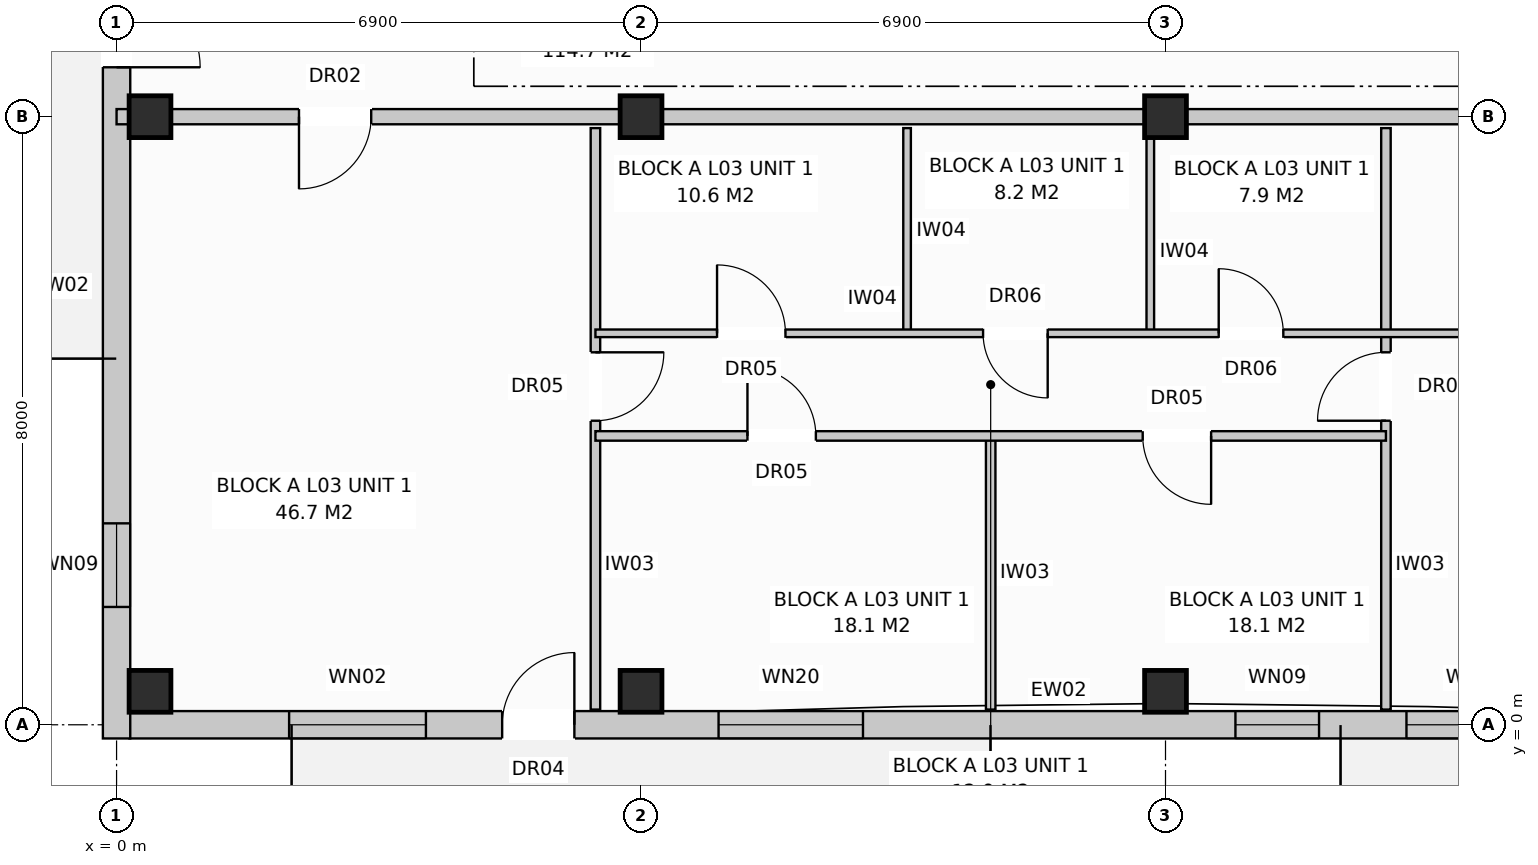
"""IFC4 building model, lengths in metres.
Left out: names, types, materials, properties, quantities, classifications, styles, units other than length and angle.
Written with IfcOpenShell. Run it as: python <this file> out.ifc"""

import sys

from ifc_helpers import new_model, si_unit, direction, frame, frame_2d, origin, origin_with_axes, origin_2d, place, context, subcontext, project, spatial, rectangle, extrude, element, fill, save


model = new_model("IFC4")
c1 = context("Model", 3, precision=1e-05, world=origin(), true_north=direction((0.0, 1.0)))
c2 = subcontext(c1, "Body", "Model", "MODEL_VIEW")
j1 = project(units=[si_unit("LENGTHUNIT", "METRE"), si_unit("PLANEANGLEUNIT", "RADIAN")], contexts=[c1])
p1 = place(None, origin())
s1 = spatial("IfcSite", under=j1, at=p1, CompositionType="ELEMENT")
p2 = place(p1, origin())
s2 = spatial("IfcBuilding", under=s1, at=p2, CompositionType="ELEMENT")
p3 = place(p2, frame((0.0, 0.0, 11.2)))
s3 = spatial("IfcBuildingStorey", under=s2, at=p3, CompositionType="ELEMENT", Elevation=11.2)
for number, where, z_axis, x_axis in (
    (1, (0.44, 0.44, 0.0), (0.0, 0.0, 1.0), (1.0, 0.0, 0.0)),
    (2, (0.44, 8.0, 0.0), (0.0, 0.0, 1.0), (1.0, 0.0, 0.0)),
    (3, (6.9, 0.44, 0.0), (0.0, 0.0, 1.0), (1.0, 0.0, 0.0)),
    (4, (6.9, 8.0, 0.0), (0.0, 0.0, 1.0), (1.0, 0.0, 0.0)),
    (5, (13.8, 0.44, 0.0), (0.0, 0.0, 1.0), (1.0, 0.0, 0.0)),
    (6, (13.8, 8.0, 0.0), (0.0, 0.0, 1.0), (1.0, 0.0, 0.0)),
):
    element("IfcColumn", number, at=place(p3, frame(where, z_axis=z_axis, x_axis=x_axis)), inside=s3, PredefinedType="COLUMN", context=c2, shape_type="SweptSolid", body=[
        extrude(rectangle(XDim=0.55, YDim=0.55, at=origin_2d()), origin(), (0.0, 0.0, 1.0), 3.2),
    ])
p4 = place(p3, frame((0.17, 0.0, 0.0), z_axis=(0.0, 0.0, 1.0), x_axis=(1.0, 0.0, 0.0)))
e7 = element("IfcWall", 7, at=p4, inside=s3, PredefinedType="STANDARD", context=c2, shape_type="SweptSolid", body=[
    extrude(rectangle(XDim=54.86, YDim=0.36, at=frame_2d((27.43, 0.0))), origin(), (0.0, 0.0, 1.0), 2.94),
])
p5 = place(p4, frame((4.903, 0.0, 0.0)))
e8 = element("IfcOpeningElement", 8, at=p5, cuts=e7, PredefinedType="OPENING", context=c2, shape_type="SweptSolid", body=[
    extrude(rectangle(XDim=0.95, YDim=2.1, at=frame_2d((0.475, 1.05))), frame((0.0, 0.192, 0.0), z_axis=(0.0, -1.0, 0.0), x_axis=(1.0, 0.0, 0.0)), (0.0, 0.0, 1.0), 0.384),
])
p6 = place(p4, frame((18.9, 0.0, 0.0)))
e9 = element("IfcOpeningElement", 9, at=p6, cuts=e7, PredefinedType="OPENING", context=c2, shape_type="SweptSolid", body=[
    extrude(rectangle(XDim=0.95, YDim=2.1, at=frame_2d((0.475, 1.05))), frame((0.0, 0.192, 0.0), z_axis=(0.0, -1.0, 0.0), x_axis=(1.0, 0.0, 0.0)), (0.0, 0.0, 1.0), 0.384),
])
p7 = place(p4, frame((31.403, 0.0, 0.0)))
e10 = element("IfcOpeningElement", 10, at=p7, cuts=e7, PredefinedType="OPENING", context=c2, shape_type="SweptSolid", body=[
    extrude(rectangle(XDim=0.95, YDim=2.1, at=frame_2d((0.475, 1.05))), frame((0.0, 0.192, 0.0), z_axis=(0.0, -1.0, 0.0), x_axis=(1.0, 0.0, 0.0)), (0.0, 0.0, 1.0), 0.384),
])
p8 = place(p4, frame((44.308, 0.0, 0.0)))
e11 = element("IfcOpeningElement", 11, at=p8, cuts=e7, PredefinedType="OPENING", context=c2, shape_type="SweptSolid", body=[
    extrude(rectangle(XDim=0.95, YDim=2.1, at=frame_2d((0.475, 1.05))), frame((0.0, 0.192, 0.0), z_axis=(0.0, -1.0, 0.0), x_axis=(1.0, 0.0, 0.0)), (0.0, 0.0, 1.0), 0.384),
])
p9 = place(p4, frame((2.1, 0.0, 0.8)))
e12 = element("IfcOpeningElement", 12, at=p9, cuts=e7, PredefinedType="OPENING", context=c2, shape_type="SweptSolid", body=[
    extrude(rectangle(XDim=1.8, YDim=1.7, at=frame_2d((0.9, 0.85))), frame((0.0, 0.192, 0.0), z_axis=(0.0, -1.0, 0.0), x_axis=(1.0, 0.0, 0.0)), (0.0, 0.0, 1.0), 0.384),
])
p10 = place(p4, frame((7.75, 0.0, 0.72)))
e13 = element("IfcOpeningElement", 13, at=p10, cuts=e7, PredefinedType="OPENING", context=c2, shape_type="SweptSolid", body=[
    extrude(rectangle(XDim=1.9, YDim=1.85, at=frame_2d((0.95, 0.925))), frame((0.0, 0.192, 0.0), z_axis=(0.0, -1.0, 0.0), x_axis=(1.0, 0.0, 0.0)), (0.0, 0.0, 1.0), 0.384),
])
p11 = place(p4, frame((14.55, 0.0, 0.72)))
e14 = element("IfcOpeningElement", 14, at=p11, cuts=e7, PredefinedType="OPENING", context=c2, shape_type="SweptSolid", body=[
    extrude(rectangle(XDim=1.1, YDim=1.5, at=frame_2d((0.55, 0.75))), frame((0.0, 0.192, 0.0), z_axis=(0.0, -1.0, 0.0), x_axis=(1.0, 0.0, 0.0)), (0.0, 0.0, 1.0), 0.384),
])
p12 = place(p4, frame((16.8, 0.0, 0.8)))
e15 = element("IfcOpeningElement", 15, at=p12, cuts=e7, PredefinedType="OPENING", context=c2, shape_type="SweptSolid", body=[
    extrude(rectangle(XDim=1.8, YDim=1.7, at=frame_2d((0.9, 0.85))), frame((0.0, 0.192, 0.0), z_axis=(0.0, -1.0, 0.0), x_axis=(1.0, 0.0, 0.0)), (0.0, 0.0, 1.0), 0.384),
])
p13 = place(p4, frame((21.55, 0.0, 0.72)))
e16 = element("IfcOpeningElement", 16, at=p13, cuts=e7, PredefinedType="OPENING", context=c2, shape_type="SweptSolid", body=[
    extrude(rectangle(XDim=1.9, YDim=1.85, at=frame_2d((0.95, 0.925))), frame((0.0, 0.192, 0.0), z_axis=(0.0, -1.0, 0.0), x_axis=(1.0, 0.0, 0.0)), (0.0, 0.0, 1.0), 0.384),
])
p14 = place(p4, frame((25.35, 0.0, 0.72)))
e17 = element("IfcOpeningElement", 17, at=p14, cuts=e7, PredefinedType="OPENING", context=c2, shape_type="SweptSolid", body=[
    extrude(rectangle(XDim=1.1, YDim=1.5, at=frame_2d((0.55, 0.75))), frame((0.0, 0.192, 0.0), z_axis=(0.0, -1.0, 0.0), x_axis=(1.0, 0.0, 0.0)), (0.0, 0.0, 1.0), 0.384),
])
p15 = place(p4, frame((29.55, 0.0, 0.72)))
e18 = element("IfcOpeningElement", 18, at=p15, cuts=e7, PredefinedType="OPENING", context=c2, shape_type="SweptSolid", body=[
    extrude(rectangle(XDim=1.1, YDim=1.5, at=frame_2d((0.55, 0.75))), frame((0.0, 0.192, 0.0), z_axis=(0.0, -1.0, 0.0), x_axis=(1.0, 0.0, 0.0)), (0.0, 0.0, 1.0), 0.384),
])
p16 = place(p4, frame((34.833, 0.0, 0.72)))
e19 = element("IfcOpeningElement", 19, at=p16, cuts=e7, PredefinedType="OPENING", context=c2, shape_type="SweptSolid", body=[
    extrude(rectangle(XDim=1.9, YDim=1.85, at=frame_2d((0.95, 0.925))), frame((0.0, 0.192, 0.0), z_axis=(0.0, -1.0, 0.0), x_axis=(1.0, 0.0, 0.0)), (0.0, 0.0, 1.0), 0.384),
])
p17 = place(p4, frame((38.45, 0.0, 0.72)))
e20 = element("IfcOpeningElement", 20, at=p17, cuts=e7, PredefinedType="OPENING", context=c2, shape_type="SweptSolid", body=[
    extrude(rectangle(XDim=1.1, YDim=1.5, at=frame_2d((0.55, 0.75))), frame((0.0, 0.192, 0.0), z_axis=(0.0, -1.0, 0.0), x_axis=(1.0, 0.0, 0.0)), (0.0, 0.0, 1.0), 0.384),
])
p18 = place(p4, frame((42.55, 0.0, 0.72)))
e21 = element("IfcOpeningElement", 21, at=p18, cuts=e7, PredefinedType="OPENING", context=c2, shape_type="SweptSolid", body=[
    extrude(rectangle(XDim=1.1, YDim=1.5, at=frame_2d((0.55, 0.75))), frame((0.0, 0.192, 0.0), z_axis=(0.0, -1.0, 0.0), x_axis=(1.0, 0.0, 0.0)), (0.0, 0.0, 1.0), 0.384),
])
p19 = place(p4, frame((45.75, 0.0, 0.72)))
e22 = element("IfcOpeningElement", 22, at=p19, cuts=e7, PredefinedType="OPENING", context=c2, shape_type="SweptSolid", body=[
    extrude(rectangle(XDim=1.9, YDim=1.85, at=frame_2d((0.95, 0.925))), frame((0.0, 0.192, 0.0), z_axis=(0.0, -1.0, 0.0), x_axis=(1.0, 0.0, 0.0)), (0.0, 0.0, 1.0), 0.384),
])
p20 = place(p4, frame((49.125, 0.0, 0.8)))
e23 = element("IfcOpeningElement", 23, at=p20, cuts=e7, PredefinedType="OPENING", context=c2, shape_type="SweptSolid", body=[
    extrude(rectangle(XDim=1.95, YDim=1.65, at=frame_2d((0.975, 0.825))), frame((0.0, 0.192, 0.0), z_axis=(0.0, -1.0, 0.0), x_axis=(1.0, 0.0, 0.0)), (0.0, 0.0, 1.0), 0.384),
])
p21 = place(p4, frame((52.95, 0.0, 0.72)))
e24 = element("IfcOpeningElement", 24, at=p21, cuts=e7, PredefinedType="OPENING", context=c2, shape_type="SweptSolid", body=[
    extrude(rectangle(XDim=1.1, YDim=1.5, at=frame_2d((0.55, 0.75))), frame((0.0, 0.192, 0.0), z_axis=(0.0, -1.0, 0.0), x_axis=(1.0, 0.0, 0.0)), (0.0, 0.0, 1.0), 0.384),
])
p22 = place(p3, frame((0.0, -0.18, 0.0), z_axis=(0.0, 0.0, 1.0), x_axis=(0.0, 1.0, 0.0)))
e25 = element("IfcWall", 25, at=p22, inside=s3, PredefinedType="STANDARD", context=c2, shape_type="SweptSolid", body=[
    extrude(rectangle(XDim=18.76, YDim=0.36, at=frame_2d((9.38, 0.0))), origin(), (0.0, 0.0, 1.0), 2.94),
])
p23 = place(p22, frame((8.83, 0.0, 0.0)))
e26 = element("IfcOpeningElement", 26, at=p23, cuts=e25, PredefinedType="OPENING", context=c2, shape_type="SweptSolid", body=[
    extrude(rectangle(XDim=1.1, YDim=2.1, at=frame_2d((0.55, 1.05))), frame((0.0, 0.192, 0.0), z_axis=(0.0, -1.0, 0.0), x_axis=(1.0, 0.0, 0.0)), (0.0, 0.0, 1.0), 0.384),
])
p24 = place(p22, frame((1.73, 0.0, 0.72)))
e27 = element("IfcOpeningElement", 27, at=p24, cuts=e25, PredefinedType="OPENING", context=c2, shape_type="SweptSolid", body=[
    extrude(rectangle(XDim=1.1, YDim=1.5, at=frame_2d((0.55, 0.75))), frame((0.0, 0.192, 0.0), z_axis=(0.0, -1.0, 0.0), x_axis=(1.0, 0.0, 0.0)), (0.0, 0.0, 1.0), 0.384),
])
p25 = place(p22, frame((15.93, 0.0, 0.72)))
e28 = element("IfcOpeningElement", 28, at=p25, cuts=e25, PredefinedType="OPENING", context=c2, shape_type="SweptSolid", body=[
    extrude(rectangle(XDim=1.1, YDim=1.5, at=frame_2d((0.55, 0.75))), frame((0.0, 0.192, 0.0), z_axis=(0.0, -1.0, 0.0), x_axis=(1.0, 0.0, 0.0)), (0.0, 0.0, 1.0), 0.384),
])
p26 = place(p3, frame((0.0, 8.0, 0.0), z_axis=(0.0, 0.0, 1.0), x_axis=(1.0, 0.0, 0.0)))
e29 = element("IfcWall", 29, at=p26, inside=s3, PredefinedType="PARTITIONING", context=c2, shape_type="SweptSolid", body=[
    extrude(rectangle(XDim=20.7, YDim=0.2, at=frame_2d((10.35, 0.0))), origin(), (0.0, 0.0, 1.0), 2.38),
])
p27 = place(p26, frame((2.4, 0.0, 0.0)))
e30 = element("IfcOpeningElement", 30, at=p27, cuts=e29, PredefinedType="OPENING", context=c2, shape_type="SweptSolid", body=[
    extrude(rectangle(XDim=0.95, YDim=2.15, at=frame_2d((0.475, 1.075))), frame((0.0, 0.112, 0.0), z_axis=(0.0, -1.0, 0.0), x_axis=(1.0, 0.0, 0.0)), (0.0, 0.0, 1.0), 0.224),
])
p28 = place(p3, frame((6.3, 7.85, 0.0), z_axis=(0.0, 0.0, 1.0), x_axis=(0.0, -1.0, 0.0)))
e31 = element("IfcWall", 31, at=p28, inside=s3, PredefinedType="PARTITIONING", context=c2, shape_type="SweptSolid", body=[
    extrude(rectangle(XDim=7.65, YDim=0.125, at=frame_2d((3.825, 0.0))), origin(), (0.0, 0.0, 1.0), 2.94),
])
p29 = place(p28, frame((2.95, 0.0, 0.0)))
e32 = element("IfcOpeningElement", 32, at=p29, cuts=e31, PredefinedType="OPENING", context=c2, shape_type="SweptSolid", body=[
    extrude(rectangle(XDim=0.9, YDim=2.1, at=frame_2d((0.45, 1.05))), frame((0.0, 0.074, 0.0), z_axis=(0.0, -1.0, 0.0), x_axis=(1.0, 0.0, 0.0)), (0.0, 0.0, 1.0), 0.149),
])
for number, where, z_axis, x_axis in (
    (33, (10.4, 7.85, 0.0), (0.0, 0.0, 1.0), (0.0, -1.0, 0.0)),
    (34, (13.6, 7.85, 0.0), (0.0, 0.0, 1.0), (0.0, -1.0, 0.0)),
):
    element("IfcWall", number, at=place(p3, frame(where, z_axis=z_axis, x_axis=x_axis)), inside=s3, PredefinedType="PARTITIONING", context=c2, shape_type="SweptSolid", body=[
        extrude(rectangle(XDim=2.7, YDim=0.1, at=frame_2d((1.35, 0.0))), origin(), (0.0, 0.0, 1.0), 2.94),
    ])
p30 = place(p3, frame((11.5, 3.8, 0.0), z_axis=(0.0, 0.0, 1.0), x_axis=(0.0, -1.0, 0.0)))
e35 = element("IfcWall", 35, at=p30, inside=s3, PredefinedType="PARTITIONING", context=c2, shape_type="SweptSolid", body=[
    extrude(rectangle(XDim=3.6, YDim=0.125, at=frame_2d((1.8, 0.0))), origin(), (0.0, 0.0, 1.0), 2.94),
])
p31 = place(p3, frame((16.7, 7.85, 0.0), z_axis=(0.0, 0.0, 1.0), x_axis=(0.0, -1.0, 0.0)))
e36 = element("IfcWall", 36, at=p31, inside=s3, PredefinedType="PARTITIONING", context=c2, shape_type="SweptSolid", body=[
    extrude(rectangle(XDim=7.65, YDim=0.125, at=frame_2d((3.825, 0.0))), origin(), (0.0, 0.0, 1.0), 2.94),
])
p32 = place(p31, frame((2.95, 0.0, 0.0)))
e37 = element("IfcOpeningElement", 37, at=p32, cuts=e36, PredefinedType="OPENING", context=c2, shape_type="SweptSolid", body=[
    extrude(rectangle(XDim=0.9, YDim=2.1, at=frame_2d((0.45, 1.05))), frame((0.0, 0.074, 0.0), z_axis=(0.0, -1.0, 0.0), x_axis=(1.0, 0.0, 0.0)), (0.0, 0.0, 1.0), 0.149),
])
p33 = place(p3, frame((6.3, 5.15, 0.0), z_axis=(0.0, 0.0, 1.0), x_axis=(1.0, 0.0, 0.0)))
e38 = element("IfcWall", 38, at=p33, inside=s3, PredefinedType="PARTITIONING", context=c2, shape_type="SweptSolid", body=[
    extrude(rectangle(XDim=14.3, YDim=0.1, at=frame_2d((7.15, 0.0))), origin(), (0.0, 0.0, 1.0), 2.94),
])
p34 = place(p33, frame((1.6, 0.0, 0.0)))
e39 = element("IfcOpeningElement", 39, at=p34, cuts=e38, PredefinedType="OPENING", context=c2, shape_type="SweptSolid", body=[
    extrude(rectangle(XDim=0.9, YDim=2.1, at=frame_2d((0.45, 1.05))), frame((0.0, 0.062, 0.0), z_axis=(0.0, -1.0, 0.0), x_axis=(1.0, 0.0, 0.0)), (0.0, 0.0, 1.0), 0.124),
])
p35 = place(p33, frame((5.1, 0.0, 0.0)))
e40 = element("IfcOpeningElement", 40, at=p35, cuts=e38, PredefinedType="OPENING", context=c2, shape_type="SweptSolid", body=[
    extrude(rectangle(XDim=0.85, YDim=2.05, at=frame_2d((0.425, 1.025))), frame((0.0, 0.062, 0.0), z_axis=(0.0, -1.0, 0.0), x_axis=(1.0, 0.0, 0.0)), (0.0, 0.0, 1.0), 0.124),
])
p36 = place(p33, frame((8.2, 0.0, 0.0)))
e41 = element("IfcOpeningElement", 41, at=p36, cuts=e38, PredefinedType="OPENING", context=c2, shape_type="SweptSolid", body=[
    extrude(rectangle(XDim=0.85, YDim=2.05, at=frame_2d((0.425, 1.025))), frame((0.0, 0.062, 0.0), z_axis=(0.0, -1.0, 0.0), x_axis=(1.0, 0.0, 0.0)), (0.0, 0.0, 1.0), 0.124),
])
p37 = place(p33, frame((11.6, 0.0, 0.0)))
e42 = element("IfcOpeningElement", 42, at=p37, cuts=e38, PredefinedType="OPENING", context=c2, shape_type="SweptSolid", body=[
    extrude(rectangle(XDim=0.85, YDim=2.05, at=frame_2d((0.425, 1.025))), frame((0.0, 0.062, 0.0), z_axis=(0.0, -1.0, 0.0), x_axis=(1.0, 0.0, 0.0)), (0.0, 0.0, 1.0), 0.124),
])
p38 = place(p3, frame((6.3, 3.8, 0.0), z_axis=(0.0, 0.0, 1.0), x_axis=(1.0, 0.0, 0.0)))
e43 = element("IfcWall", 43, at=p38, inside=s3, PredefinedType="PARTITIONING", context=c2, shape_type="SweptSolid", body=[
    extrude(rectangle(XDim=10.4, YDim=0.125, at=frame_2d((5.2, 0.0))), origin(), (0.0, 0.0, 1.0), 2.94),
])
p39 = place(p38, frame((2.0, 0.0, 0.0)))
e44 = element("IfcOpeningElement", 44, at=p39, cuts=e43, PredefinedType="OPENING", context=c2, shape_type="SweptSolid", body=[
    extrude(rectangle(XDim=0.9, YDim=2.1, at=frame_2d((0.45, 1.05))), frame((0.0, 0.074, 0.0), z_axis=(0.0, -1.0, 0.0), x_axis=(1.0, 0.0, 0.0)), (0.0, 0.0, 1.0), 0.149),
])
p40 = place(p38, frame((7.2, 0.0, 0.0)))
e45 = element("IfcOpeningElement", 45, at=p40, cuts=e43, PredefinedType="OPENING", context=c2, shape_type="SweptSolid", body=[
    extrude(rectangle(XDim=0.9, YDim=2.1, at=frame_2d((0.45, 1.05))), frame((0.0, 0.074, 0.0), z_axis=(0.0, -1.0, 0.0), x_axis=(1.0, 0.0, 0.0)), (0.0, 0.0, 1.0), 0.149),
])
p41 = place(p5, origin_with_axes())
e46 = element("IfcDoor", 46, at=p41, inside=s3, OperationType="SINGLE_SWING_RIGHT", PredefinedType="DOOR", context=c2, shape_type="SweptSolid", body=[
    extrude(rectangle(XDim=0.95, YDim=2.1, at=frame_2d((0.475, 1.05))), frame((0.0, 0.025, 0.0), z_axis=(0.0, -1.0, 0.0), x_axis=(1.0, 0.0, 0.0)), (0.0, 0.0, 1.0), 0.05),
])
fill(e8, e46)
p42 = place(p9, origin_with_axes())
e47 = element("IfcWindow", 47, at=p42, inside=s3, PartitioningType="SINGLE_PANEL", PredefinedType="WINDOW", context=c2, shape_type="SweptSolid", body=[
    extrude(rectangle(XDim=1.8, YDim=1.7, at=frame_2d((0.9, 0.85))), frame((0.0, 0.03, 0.0), z_axis=(0.0, -1.0, 0.0), x_axis=(1.0, 0.0, 0.0)), (0.0, 0.0, 1.0), 0.06),
])
fill(e12, e47)
p43 = place(p10, origin_with_axes())
e48 = element("IfcWindow", 48, at=p43, inside=s3, PartitioningType="SINGLE_PANEL", PredefinedType="WINDOW", context=c2, shape_type="SweptSolid", body=[
    extrude(rectangle(XDim=1.9, YDim=1.85, at=frame_2d((0.95, 0.925))), frame((0.0, 0.03, 0.0), z_axis=(0.0, -1.0, 0.0), x_axis=(1.0, 0.0, 0.0)), (0.0, 0.0, 1.0), 0.06),
])
fill(e13, e48)
p44 = place(p11, origin_with_axes())
e49 = element("IfcWindow", 49, at=p44, inside=s3, PartitioningType="SINGLE_PANEL", PredefinedType="WINDOW", context=c2, shape_type="SweptSolid", body=[
    extrude(rectangle(XDim=1.1, YDim=1.5, at=frame_2d((0.55, 0.75))), frame((0.0, 0.03, 0.0), z_axis=(0.0, -1.0, 0.0), x_axis=(1.0, 0.0, 0.0)), (0.0, 0.0, 1.0), 0.06),
])
fill(e14, e49)
p45 = place(p12, origin_with_axes())
e50 = element("IfcWindow", 50, at=p45, inside=s3, PartitioningType="SINGLE_PANEL", PredefinedType="WINDOW", context=c2, shape_type="SweptSolid", body=[
    extrude(rectangle(XDim=1.8, YDim=1.7, at=frame_2d((0.9, 0.85))), frame((0.0, 0.03, 0.0), z_axis=(0.0, -1.0, 0.0), x_axis=(1.0, 0.0, 0.0)), (0.0, 0.0, 1.0), 0.06),
])
fill(e15, e50)
p46 = place(p23, frame((1.1, 0.0, 0.0), z_axis=(0.0, 0.0, 1.0), x_axis=(-1.0, 0.0, 0.0)))
e51 = element("IfcDoor", 51, at=p46, inside=s3, OperationType="SINGLE_SWING_LEFT", PredefinedType="DOOR", context=c2, shape_type="SweptSolid", body=[
    extrude(rectangle(XDim=1.1, YDim=2.1, at=frame_2d((0.55, 1.05))), frame((0.0, 0.025, 0.0), z_axis=(0.0, -1.0, 0.0), x_axis=(1.0, 0.0, 0.0)), (0.0, 0.0, 1.0), 0.05),
])
fill(e26, e51)
p47 = place(p24, origin_with_axes())
e52 = element("IfcWindow", 52, at=p47, inside=s3, PartitioningType="SINGLE_PANEL", PredefinedType="WINDOW", context=c2, shape_type="SweptSolid", body=[
    extrude(rectangle(XDim=1.1, YDim=1.5, at=frame_2d((0.55, 0.75))), frame((0.0, 0.03, 0.0), z_axis=(0.0, -1.0, 0.0), x_axis=(1.0, 0.0, 0.0)), (0.0, 0.0, 1.0), 0.06),
])
fill(e27, e52)
p48 = place(p27, frame((0.95, 0.0, 0.0), z_axis=(0.0, 0.0, 1.0), x_axis=(-1.0, 0.0, 0.0)))
e53 = element("IfcDoor", 53, at=p48, inside=s3, OperationType="SINGLE_SWING_LEFT", PredefinedType="DOOR", context=c2, shape_type="SweptSolid", body=[
    extrude(rectangle(XDim=0.95, YDim=2.15, at=frame_2d((0.475, 1.075))), frame((0.0, 0.025, 0.0), z_axis=(0.0, -1.0, 0.0), x_axis=(1.0, 0.0, 0.0)), (0.0, 0.0, 1.0), 0.05),
])
fill(e30, e53)
p49 = place(p29, origin_with_axes())
e54 = element("IfcDoor", 54, at=p49, inside=s3, OperationType="SINGLE_SWING_LEFT", PredefinedType="DOOR", context=c2, shape_type="SweptSolid", body=[
    extrude(rectangle(XDim=0.9, YDim=2.1, at=frame_2d((0.45, 1.05))), frame((0.0, 0.025, 0.0), z_axis=(0.0, -1.0, 0.0), x_axis=(1.0, 0.0, 0.0)), (0.0, 0.0, 1.0), 0.05),
])
fill(e32, e54)
p50 = place(p32, frame((0.9, 0.0, 0.0), z_axis=(0.0, 0.0, 1.0), x_axis=(-1.0, 0.0, 0.0)))
e55 = element("IfcDoor", 55, at=p50, inside=s3, OperationType="SINGLE_SWING_RIGHT", PredefinedType="DOOR", context=c2, shape_type="SweptSolid", body=[
    extrude(rectangle(XDim=0.9, YDim=2.1, at=frame_2d((0.45, 1.05))), frame((0.0, 0.025, 0.0), z_axis=(0.0, -1.0, 0.0), x_axis=(1.0, 0.0, 0.0)), (0.0, 0.0, 1.0), 0.05),
])
fill(e37, e55)
p51 = place(p34, origin_with_axes())
e56 = element("IfcDoor", 56, at=p51, inside=s3, OperationType="SINGLE_SWING_LEFT", PredefinedType="DOOR", context=c2, shape_type="SweptSolid", body=[
    extrude(rectangle(XDim=0.9, YDim=2.1, at=frame_2d((0.45, 1.05))), frame((0.0, 0.025, 0.0), z_axis=(0.0, -1.0, 0.0), x_axis=(1.0, 0.0, 0.0)), (0.0, 0.0, 1.0), 0.05),
])
fill(e39, e56)
p52 = place(p35, frame((0.85, 0.0, 0.0), z_axis=(0.0, 0.0, 1.0), x_axis=(-1.0, 0.0, 0.0)))
e57 = element("IfcDoor", 57, at=p52, inside=s3, OperationType="SINGLE_SWING_RIGHT", PredefinedType="DOOR", context=c2, shape_type="SweptSolid", body=[
    extrude(rectangle(XDim=0.85, YDim=2.05, at=frame_2d((0.425, 1.025))), frame((0.0, 0.025, 0.0), z_axis=(0.0, -1.0, 0.0), x_axis=(1.0, 0.0, 0.0)), (0.0, 0.0, 1.0), 0.05),
])
fill(e40, e57)
p53 = place(p36, origin_with_axes())
e58 = element("IfcDoor", 58, at=p53, inside=s3, OperationType="SINGLE_SWING_LEFT", PredefinedType="DOOR", context=c2, shape_type="SweptSolid", body=[
    extrude(rectangle(XDim=0.85, YDim=2.05, at=frame_2d((0.425, 1.025))), frame((0.0, 0.025, 0.0), z_axis=(0.0, -1.0, 0.0), x_axis=(1.0, 0.0, 0.0)), (0.0, 0.0, 1.0), 0.05),
])
fill(e41, e58)
p54 = place(p39, origin_with_axes())
e59 = element("IfcDoor", 59, at=p54, inside=s3, OperationType="SINGLE_SWING_LEFT", PredefinedType="DOOR", context=c2, shape_type="SweptSolid", body=[
    extrude(rectangle(XDim=0.9, YDim=2.1, at=frame_2d((0.45, 1.05))), frame((0.0, 0.025, 0.0), z_axis=(0.0, -1.0, 0.0), x_axis=(1.0, 0.0, 0.0)), (0.0, 0.0, 1.0), 0.05),
])
fill(e44, e59)
p55 = place(p40, frame((0.9, 0.0, 0.0), z_axis=(0.0, 0.0, 1.0), x_axis=(-1.0, 0.0, 0.0)))
e60 = element("IfcDoor", 60, at=p55, inside=s3, OperationType="SINGLE_SWING_RIGHT", PredefinedType="DOOR", context=c2, shape_type="SweptSolid", body=[
    extrude(rectangle(XDim=0.9, YDim=2.1, at=frame_2d((0.45, 1.05))), frame((0.0, 0.025, 0.0), z_axis=(0.0, -1.0, 0.0), x_axis=(1.0, 0.0, 0.0)), (0.0, 0.0, 1.0), 0.05),
])
fill(e45, e60)
save(model, sys.argv[1])
